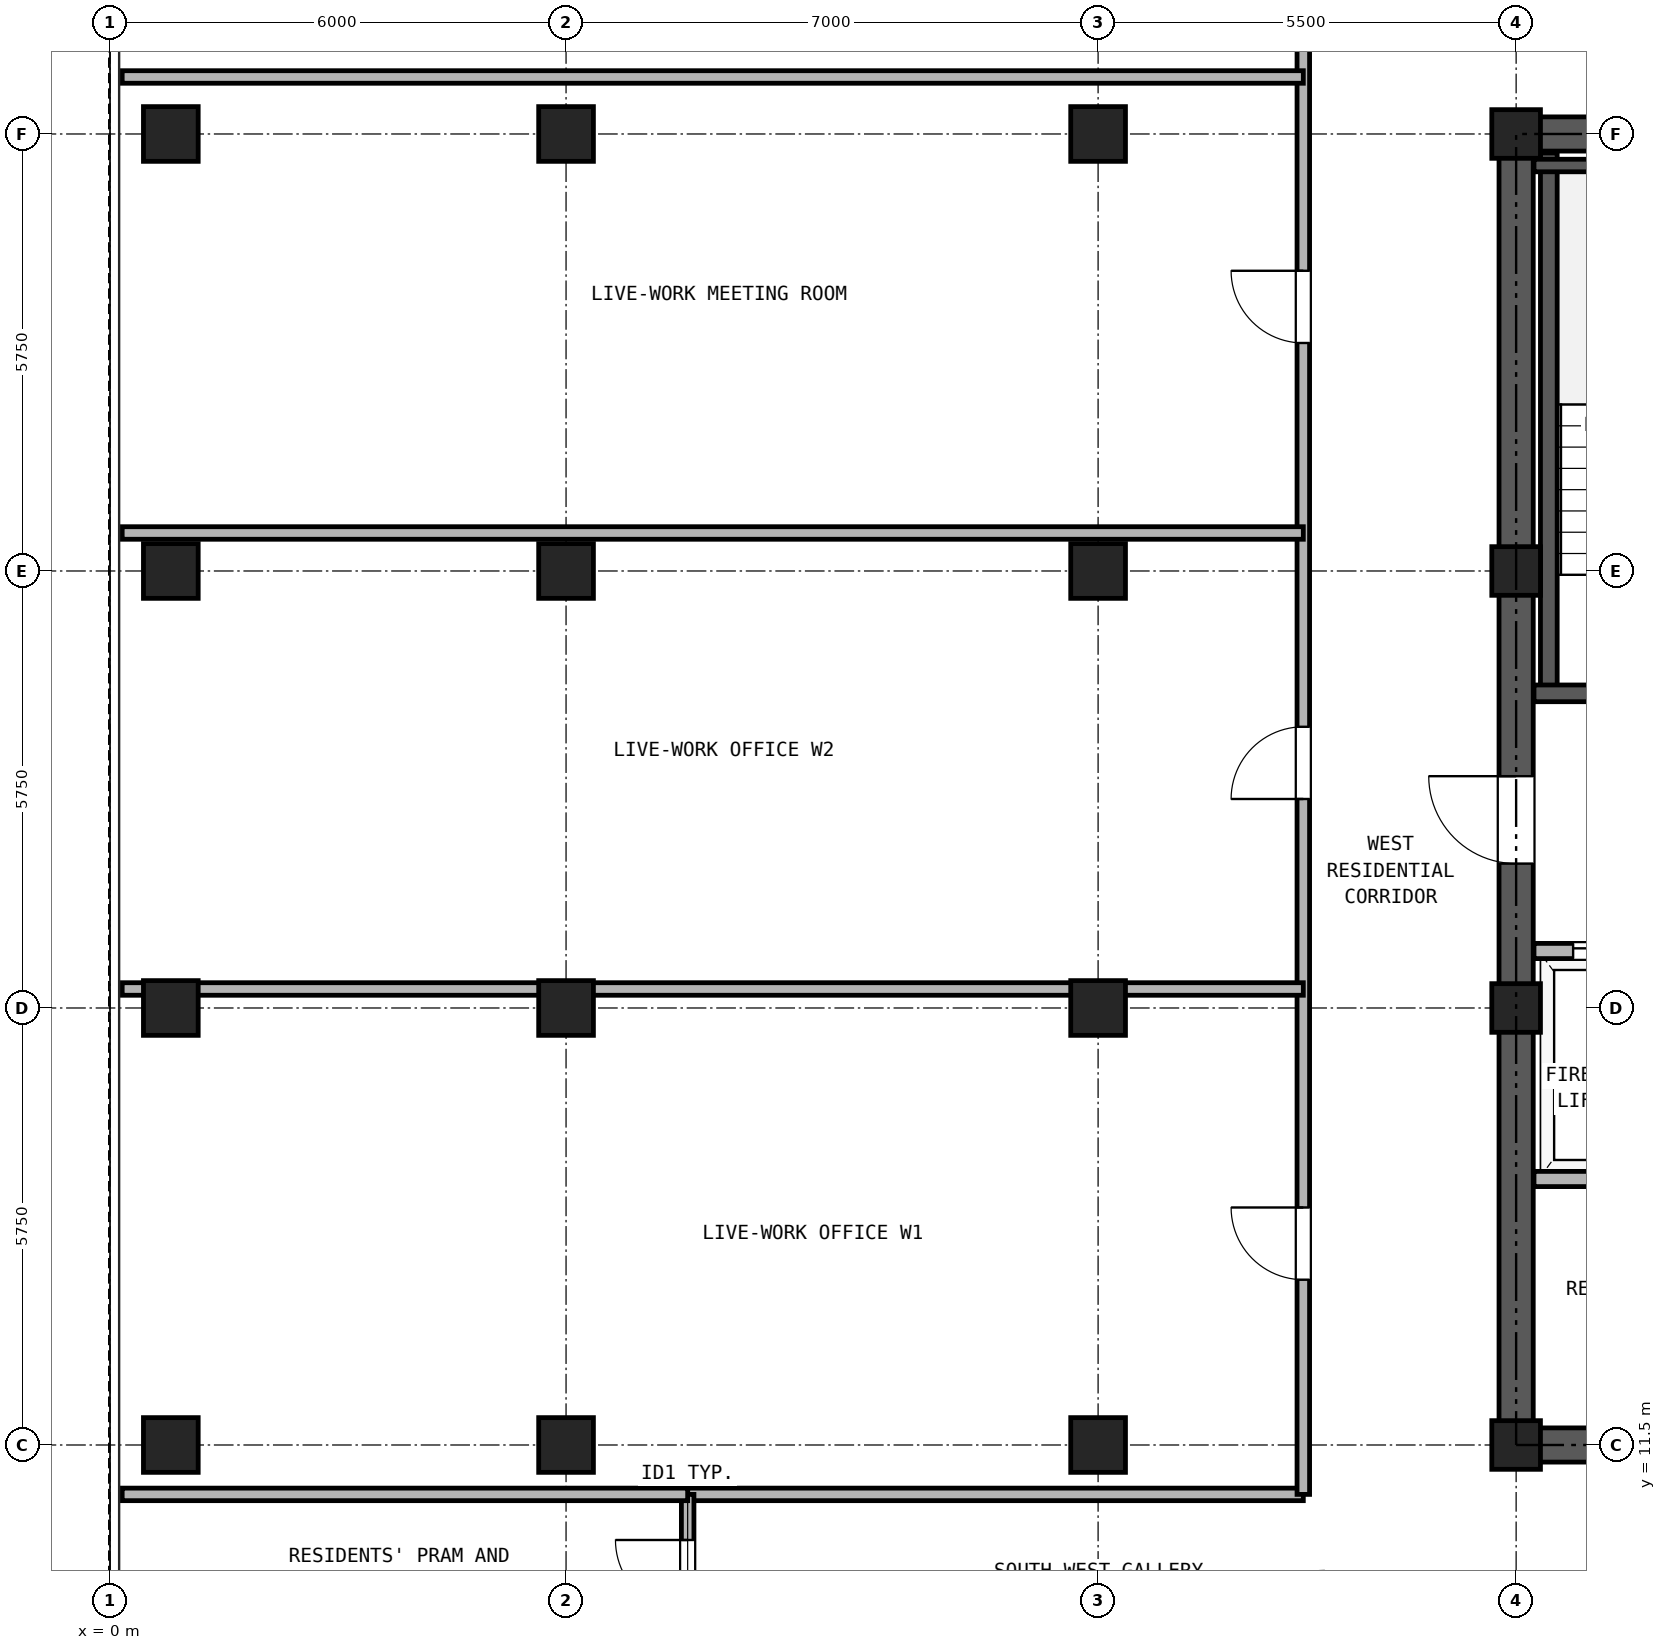
"""IFC4 building model, lengths in metres.
Left out: names, types, materials, properties, quantities, classifications, styles, units other than length and angle.
Written with IfcOpenShell. Run it as: python <this file> out.ifc"""

import sys

from ifc_helpers import new_model, si_unit, direction, frame, frame_2d, origin, origin_2d, place, context, subcontext, project, spatial, rectangle, hollow_rectangle, extrude, source, transform, mapped, element, fill, save


model = new_model("IFC4")
c1 = context("Model", 3, precision=1e-05, world=origin(), true_north=direction((0.0, 1.0)))
c2 = subcontext(c1, "Body", "Model", "MODEL_VIEW")
j1 = project(units=[si_unit("LENGTHUNIT", "METRE"), si_unit("PLANEANGLEUNIT", "RADIAN")], contexts=[c1])
p1 = place(None, origin())
s1 = spatial("IfcSite", under=j1, at=p1, CompositionType="ELEMENT")
p2 = place(p1, origin())
s2 = spatial("IfcBuilding", under=s1, at=p2, CompositionType="ELEMENT")
p3 = place(p2, frame((0.0, 0.0, 202.8)))
s3 = spatial("IfcBuildingStorey", under=s2, at=p3, CompositionType="ELEMENT", Elevation=202.8)
m1 = source(origin(), c2, "Body", "SweptSolid", [
    extrude(hollow_rectangle(XDim=0.72, YDim=0.72, WallThickness=0.04, at=origin_2d()), origin(), (0.0, 0.0, 1.0), 2.95),
])
for number, where, z_axis, x_axis in (
    (1, (0.8, 11.5, 0.0), (0.0, 0.0, 1.0), (1.0, 0.0, 0.0)),
    (2, (0.8, 17.25, 0.0), (0.0, 0.0, 1.0), (1.0, 0.0, 0.0)),
    (3, (0.8, 23.0, 0.0), (0.0, 0.0, 1.0), (1.0, 0.0, 0.0)),
    (4, (0.8, 28.75, 0.0), (0.0, 0.0, 1.0), (1.0, 0.0, 0.0)),
    (5, (6.0, 11.5, 0.0), (0.0, 0.0, 1.0), (1.0, 0.0, 0.0)),
    (6, (6.0, 17.25, 0.0), (0.0, 0.0, 1.0), (1.0, 0.0, 0.0)),
    (7, (6.0, 23.0, 0.0), (0.0, 0.0, 1.0), (1.0, 0.0, 0.0)),
    (8, (6.0, 28.75, 0.0), (0.0, 0.0, 1.0), (1.0, 0.0, 0.0)),
    (9, (13.0, 11.5, 0.0), (0.0, 0.0, 1.0), (1.0, 0.0, 0.0)),
    (10, (13.0, 17.25, 0.0), (0.0, 0.0, 1.0), (1.0, 0.0, 0.0)),
    (11, (13.0, 23.0, 0.0), (0.0, 0.0, 1.0), (1.0, 0.0, 0.0)),
    (12, (13.0, 28.75, 0.0), (0.0, 0.0, 1.0), (1.0, 0.0, 0.0)),
):
    element("IfcColumn", number, at=place(p3, frame(where, z_axis=z_axis, x_axis=x_axis)), inside=s3, PredefinedType="COLUMN", context=c2, shape_type="MappedRepresentation", body=[
        mapped(m1, transform((0.0, 0.0, 0.0), x_axis=(1.0, 0.0, 0.0), y_axis=(0.0, 1.0, 0.0), z_axis=(0.0, 0.0, 1.0), scale=1.0)),
    ])
m2 = source(origin(), c2, "Body", "SweptSolid", [
    extrude(hollow_rectangle(XDim=0.64, YDim=0.64, WallThickness=0.035, at=origin_2d()), origin(), (0.0, 0.0, 1.0), 2.95),
])
for number, where, z_axis, x_axis in (
    (13, (18.5, 11.5, 0.0), (0.0, 0.0, 1.0), (1.0, 0.0, 0.0)),
    (14, (18.5, 17.25, 0.0), (0.0, 0.0, 1.0), (1.0, 0.0, 0.0)),
    (15, (18.5, 23.0, 0.0), (0.0, 0.0, 1.0), (1.0, 0.0, 0.0)),
    (16, (18.5, 28.75, 0.0), (0.0, 0.0, 1.0), (1.0, 0.0, 0.0)),
):
    element("IfcColumn", number, at=place(p3, frame(where, z_axis=z_axis, x_axis=x_axis)), inside=s3, PredefinedType="COLUMN", context=c2, shape_type="MappedRepresentation", body=[
        mapped(m2, transform((0.0, 0.0, 0.0), x_axis=(1.0, 0.0, 0.0), y_axis=(0.0, 1.0, 0.0), z_axis=(0.0, 0.0, 1.0), scale=1.0)),
    ])
p4 = place(p3, frame((18.275, 11.5, 0.0), z_axis=(0.0, 0.0, 1.0), x_axis=(1.0, 0.0, 0.0)))
e17 = element("IfcWall", 17, at=p4, inside=s3, PredefinedType="SHEAR", context=c2, shape_type="SweptSolid", body=[
    extrude(rectangle(XDim=10.45, YDim=0.45, at=frame_2d((5.225, 0.0))), origin(), (0.0, 0.0, 1.0), 2.95),
])
p5 = place(p4, frame((1.825, 0.0, 0.0)))
e18 = element("IfcOpeningElement", 18, at=p5, cuts=e17, PredefinedType="OPENING", context=c2, shape_type="SweptSolid", body=[
    extrude(rectangle(XDim=0.95, YDim=2.15, at=frame_2d((0.475, 1.075))), frame((0.0, 0.235, 0.0), z_axis=(0.0, -1.0, 0.0), x_axis=(1.0, 0.0, 0.0)), (0.0, 0.0, 1.0), 0.47),
])
p6 = place(p4, frame((5.325, 0.0, 0.0)))
e19 = element("IfcOpeningElement", 19, at=p6, cuts=e17, PredefinedType="OPENING", context=c2, shape_type="SweptSolid", body=[
    extrude(rectangle(XDim=0.95, YDim=2.15, at=frame_2d((0.475, 1.075))), frame((0.0, 0.235, 0.0), z_axis=(0.0, -1.0, 0.0), x_axis=(1.0, 0.0, 0.0)), (0.0, 0.0, 1.0), 0.47),
])
p7 = place(p4, frame((8.225, 0.0, 0.0)))
e20 = element("IfcOpeningElement", 20, at=p7, cuts=e17, PredefinedType="OPENING", context=c2, shape_type="SweptSolid", body=[
    extrude(rectangle(XDim=1.1, YDim=2.25, at=frame_2d((0.55, 1.125))), frame((0.0, 0.235, 0.0), z_axis=(0.0, -1.0, 0.0), x_axis=(1.0, 0.0, 0.0)), (0.0, 0.0, 1.0), 0.47),
])
p8 = place(p3, frame((18.275, 28.75, 0.0), z_axis=(0.0, 0.0, 1.0), x_axis=(1.0, 0.0, 0.0)))
e21 = element("IfcWall", 21, at=p8, inside=s3, PredefinedType="SHEAR", context=c2, shape_type="SweptSolid", body=[
    extrude(rectangle(XDim=10.45, YDim=0.45, at=frame_2d((5.225, 0.0))), origin(), (0.0, 0.0, 1.0), 2.95),
])
p9 = place(p8, frame((4.105, 0.0, 0.0)))
e22 = element("IfcOpeningElement", 22, at=p9, cuts=e21, PredefinedType="OPENING", context=c2, shape_type="SweptSolid", body=[
    extrude(rectangle(XDim=0.9, YDim=2.05, at=frame_2d((0.45, 1.025))), frame((0.0, 0.235, 0.0), z_axis=(0.0, -1.0, 0.0), x_axis=(1.0, 0.0, 0.0)), (0.0, 0.0, 1.0), 0.47),
])
p10 = place(p8, frame((5.645, 0.0, 0.0)))
e23 = element("IfcOpeningElement", 23, at=p10, cuts=e21, PredefinedType="OPENING", context=c2, shape_type="SweptSolid", body=[
    extrude(rectangle(XDim=0.9, YDim=2.05, at=frame_2d((0.45, 1.025))), frame((0.0, 0.235, 0.0), z_axis=(0.0, -1.0, 0.0), x_axis=(1.0, 0.0, 0.0)), (0.0, 0.0, 1.0), 0.47),
])
p11 = place(p3, frame((18.5, 11.725, 0.0), z_axis=(0.0, 0.0, 1.0), x_axis=(0.0, 1.0, 0.0)))
e24 = element("IfcWall", 24, at=p11, inside=s3, PredefinedType="SHEAR", context=c2, shape_type="SweptSolid", body=[
    extrude(rectangle(XDim=16.8, YDim=0.45, at=frame_2d((8.4, 0.0))), origin(), (0.0, 0.0, 1.0), 2.95),
])
p12 = place(p11, frame((7.425, 0.0, 0.0)))
e25 = element("IfcOpeningElement", 25, at=p12, cuts=e24, PredefinedType="OPENING", context=c2, shape_type="SweptSolid", body=[
    extrude(rectangle(XDim=1.15, YDim=2.2, at=frame_2d((0.575, 1.1))), frame((0.0, 0.235, 0.0), z_axis=(0.0, -1.0, 0.0), x_axis=(1.0, 0.0, 0.0)), (0.0, 0.0, 1.0), 0.47),
])
p13 = place(p3, frame((18.93, 21.39, 0.0), z_axis=(0.0, 0.0, 1.0), x_axis=(0.0, 1.0, 0.0)))
e26 = element("IfcWall", 26, at=p13, inside=s3, PredefinedType="SOLIDWALL", context=c2, shape_type="SweptSolid", body=[
    extrude(rectangle(XDim=7.11, YDim=0.22, at=frame_2d((3.555, 0.0))), origin(), (0.0, 0.0, 1.0), 2.95),
])
p14 = place(p3, frame((18.735, 28.335, 0.0), z_axis=(0.0, 0.0, 1.0), x_axis=(1.0, 0.0, 0.0)))
e27 = element("IfcWall", 27, at=p14, inside=s3, PredefinedType="PARTITIONING", context=c2, shape_type="SweptSolid", body=[
    extrude(rectangle(XDim=3.375, YDim=0.165, at=frame_2d((1.688, 0.0))), origin(), (0.0, 0.0, 1.0), 2.95),
])
p15 = place(p3, frame((18.735, 21.39, 0.0), z_axis=(0.0, 0.0, 1.0), x_axis=(1.0, 0.0, 0.0)))
e28 = element("IfcWall", 28, at=p15, inside=s3, PredefinedType="SOLIDWALL", context=c2, shape_type="SweptSolid", body=[
    extrude(rectangle(XDim=6.395, YDim=0.22, at=frame_2d((3.197, 0.0))), origin(), (0.0, 0.0, 1.0), 2.95),
])
p16 = place(p15, frame((1.115, 0.0, 0.0)))
e29 = element("IfcOpeningElement", 29, at=p16, cuts=e28, PredefinedType="OPENING", context=c2, shape_type="SweptSolid", body=[
    extrude(rectangle(XDim=1.15, YDim=2.2, at=frame_2d((0.575, 1.1))), frame((0.0, 0.12, 0.0), z_axis=(0.0, -1.0, 0.0), x_axis=(1.0, 0.0, 0.0)), (0.0, 0.0, 1.0), 0.24),
])
p17 = place(p15, frame((4.845, 0.0, 0.0)))
e30 = element("IfcOpeningElement", 30, at=p17, cuts=e28, PredefinedType="OPENING", context=c2, shape_type="SweptSolid", body=[
    extrude(rectangle(XDim=1.1, YDim=2.25, at=frame_2d((0.55, 1.125))), frame((0.0, 0.12, 0.0), z_axis=(0.0, -1.0, 0.0), x_axis=(1.0, 0.0, 0.0)), (0.0, 0.0, 1.0), 0.24),
])
p18 = place(p3, frame((18.735, 18.0, 0.0), z_axis=(0.0, 0.0, 1.0), x_axis=(1.0, 0.0, 0.0)))
e31 = element("IfcWall", 31, at=p18, inside=s3, PredefinedType="PARTITIONING", context=c2, shape_type="SweptSolid", body=[
    extrude(rectangle(XDim=9.53, YDim=0.2, at=frame_2d((4.765, 0.0))), origin(), (0.0, 0.0, 1.0), 2.95),
])
p19 = place(p18, frame((0.515, 0.0, 0.0)))
e32 = element("IfcOpeningElement", 32, at=p19, cuts=e31, PredefinedType="OPENING", context=c2, shape_type="SweptSolid", body=[
    extrude(rectangle(XDim=1.3, YDim=2.3, at=frame_2d((0.65, 1.15))), frame((0.0, 0.11, 0.0), z_axis=(0.0, -1.0, 0.0), x_axis=(1.0, 0.0, 0.0)), (0.0, 0.0, 1.0), 0.22),
])
p20 = place(p18, frame((2.615, 0.0, 0.0)))
e33 = element("IfcOpeningElement", 33, at=p20, cuts=e31, PredefinedType="OPENING", context=c2, shape_type="SweptSolid", body=[
    extrude(rectangle(XDim=1.3, YDim=2.3, at=frame_2d((0.65, 1.15))), frame((0.0, 0.11, 0.0), z_axis=(0.0, -1.0, 0.0), x_axis=(1.0, 0.0, 0.0)), (0.0, 0.0, 1.0), 0.22),
])
p21 = place(p18, frame((7.115, 0.0, 0.0)))
e34 = element("IfcOpeningElement", 34, at=p21, cuts=e31, PredefinedType="OPENING", context=c2, shape_type="SweptSolid", body=[
    extrude(rectangle(XDim=1.0, YDim=2.15, at=frame_2d((0.5, 1.075))), frame((0.0, 0.11, 0.0), z_axis=(0.0, -1.0, 0.0), x_axis=(1.0, 0.0, 0.0)), (0.0, 0.0, 1.0), 0.22),
])
p22 = place(p3, frame((18.735, 15.0, 0.0), z_axis=(0.0, 0.0, 1.0), x_axis=(1.0, 0.0, 0.0)))
e35 = element("IfcWall", 35, at=p22, inside=s3, PredefinedType="PARTITIONING", context=c2, shape_type="SweptSolid", body=[
    extrude(rectangle(XDim=9.53, YDim=0.2, at=frame_2d((4.765, 0.0))), origin(), (0.0, 0.0, 1.0), 2.95),
])
p23 = place(p3, frame((7.6, 10.85, 0.0), z_axis=(0.0, 0.0, 1.0), x_axis=(1.0, 0.0, 0.0)))
e36 = element("IfcWall", 36, at=p23, inside=s3, PredefinedType="PARTITIONING", context=c2, shape_type="SweptSolid", body=[
    extrude(rectangle(XDim=8.1, YDim=0.165, at=frame_2d((4.05, 0.0))), origin(), (0.0, 0.0, 1.0), 2.95),
])
p24 = place(p3, frame((7.6, 8.85, 0.0), z_axis=(0.0, 0.0, 1.0), x_axis=(0.0, 1.0, 0.0)))
e37 = element("IfcWall", 37, at=p24, inside=s3, PredefinedType="PARTITIONING", context=c2, shape_type="SweptSolid", body=[
    extrude(rectangle(XDim=2.0, YDim=0.165, at=frame_2d((1.0, 0.0))), origin(), (0.0, 0.0, 1.0), 2.95),
])
p25 = place(p24, frame((0.45, 0.0, 0.0)))
e38 = element("IfcOpeningElement", 38, at=p25, cuts=e37, PredefinedType="OPENING", context=c2, shape_type="SweptSolid", body=[
    extrude(rectangle(XDim=0.95, YDim=2.15, at=frame_2d((0.475, 1.075))), frame((0.0, 0.093, 0.0), z_axis=(0.0, -1.0, 0.0), x_axis=(1.0, 0.0, 0.0)), (0.0, 0.0, 1.0), 0.185),
])
p26 = place(p3, frame((15.7, 10.85, 0.0), z_axis=(0.0, 0.0, 1.0), x_axis=(0.0, 1.0, 0.0)))
e39 = element("IfcWall", 39, at=p26, inside=s3, PredefinedType="PARTITIONING", context=c2, shape_type="SweptSolid", body=[
    extrude(rectangle(XDim=24.29, YDim=0.165, at=frame_2d((12.145, 0.0))), origin(), (0.0, 0.0, 1.0), 2.95),
])
p27 = place(p26, frame((2.825, 0.0, 0.0)))
e40 = element("IfcOpeningElement", 40, at=p27, cuts=e39, PredefinedType="OPENING", context=c2, shape_type="SweptSolid", body=[
    extrude(rectangle(XDim=0.95, YDim=2.15, at=frame_2d((0.475, 1.075))), frame((0.0, 0.093, 0.0), z_axis=(0.0, -1.0, 0.0), x_axis=(1.0, 0.0, 0.0)), (0.0, 0.0, 1.0), 0.185),
])
p28 = place(p26, frame((9.15, 0.0, 0.0)))
e41 = element("IfcOpeningElement", 41, at=p28, cuts=e39, PredefinedType="OPENING", context=c2, shape_type="SweptSolid", body=[
    extrude(rectangle(XDim=0.95, YDim=2.15, at=frame_2d((0.475, 1.075))), frame((0.0, 0.093, 0.0), z_axis=(0.0, -1.0, 0.0), x_axis=(1.0, 0.0, 0.0)), (0.0, 0.0, 1.0), 0.185),
])
p29 = place(p26, frame((15.15, 0.0, 0.0)))
e42 = element("IfcOpeningElement", 42, at=p29, cuts=e39, PredefinedType="OPENING", context=c2, shape_type="SweptSolid", body=[
    extrude(rectangle(XDim=0.95, YDim=2.15, at=frame_2d((0.475, 1.075))), frame((0.0, 0.093, 0.0), z_axis=(0.0, -1.0, 0.0), x_axis=(1.0, 0.0, 0.0)), (0.0, 0.0, 1.0), 0.185),
])
p30 = place(p26, frame((20.97, 0.0, 0.0)))
e43 = element("IfcOpeningElement", 43, at=p30, cuts=e39, PredefinedType="OPENING", context=c2, shape_type="SweptSolid", body=[
    extrude(rectangle(XDim=0.95, YDim=2.15, at=frame_2d((0.475, 1.075))), frame((0.0, 0.093, 0.0), z_axis=(0.0, -1.0, 0.0), x_axis=(1.0, 0.0, 0.0)), (0.0, 0.0, 1.0), 0.185),
])
p31 = place(p3, frame((0.16, 10.85, 0.0), z_axis=(0.0, 0.0, 1.0), x_axis=(1.0, 0.0, 0.0)))
e44 = element("IfcWall", 44, at=p31, inside=s3, PredefinedType="PARTITIONING", context=c2, shape_type="SweptSolid", body=[
    extrude(rectangle(XDim=7.44, YDim=0.165, at=frame_2d((3.72, 0.0))), origin(), (0.0, 0.0, 1.0), 2.95),
])
p32 = place(p3, frame((0.16, 17.5, 0.0), z_axis=(0.0, 0.0, 1.0), x_axis=(1.0, 0.0, 0.0)))
e45 = element("IfcWall", 45, at=p32, inside=s3, PredefinedType="PARTITIONING", context=c2, shape_type="SweptSolid", body=[
    extrude(rectangle(XDim=15.54, YDim=0.165, at=frame_2d((7.77, 0.0))), origin(), (0.0, 0.0, 1.0), 2.323),
])
for number, where, z_axis, x_axis in (
    (46, (0.16, 23.5, 0.0), (0.0, 0.0, 1.0), (1.0, 0.0, 0.0)),
    (47, (0.16, 29.5, 0.0), (0.0, 0.0, 1.0), (1.0, 0.0, 0.0)),
):
    element("IfcWall", number, at=place(p3, frame(where, z_axis=z_axis, x_axis=x_axis)), inside=s3, PredefinedType="PARTITIONING", context=c2, shape_type="SweptSolid", body=[
        extrude(rectangle(XDim=15.54, YDim=0.165, at=frame_2d((7.77, 0.0))), origin(), (0.0, 0.0, 1.0), 2.95),
    ])
p33 = place(p19, origin())
e48 = element("IfcDoor", 48, at=p33, inside=s3, OperationType="DOUBLE_DOOR_SLIDING", PredefinedType="DOOR", context=c2, shape_type="SweptSolid", body=[
    extrude(rectangle(XDim=1.3, YDim=2.3, at=frame_2d((0.65, 1.15))), frame((0.0, 0.025, 0.0), z_axis=(0.0, -1.0, 0.0), x_axis=(1.0, 0.0, 0.0)), (0.0, 0.0, 1.0), 0.05),
])
fill(e32, e48)
p34 = place(p12, frame((1.15, 0.0, 0.0), z_axis=(0.0, 0.0, 1.0), x_axis=(-1.0, 0.0, 0.0)))
e49 = element("IfcDoor", 49, at=p34, inside=s3, OperationType="SINGLE_SWING_RIGHT", PredefinedType="DOOR", context=c2, shape_type="SweptSolid", body=[
    extrude(rectangle(XDim=1.15, YDim=2.2, at=frame_2d((0.575, 1.1))), frame((0.0, 0.025, 0.0), z_axis=(0.0, -1.0, 0.0), x_axis=(1.0, 0.0, 0.0)), (0.0, 0.0, 1.0), 0.05),
])
fill(e25, e49)
p35 = place(p25, frame((0.95, 0.0, 0.0), z_axis=(0.0, 0.0, 1.0), x_axis=(-1.0, 0.0, 0.0)))
e50 = element("IfcDoor", 50, at=p35, inside=s3, OperationType="SINGLE_SWING_RIGHT", PredefinedType="DOOR", context=c2, shape_type="SweptSolid", body=[
    extrude(rectangle(XDim=0.95, YDim=2.15, at=frame_2d((0.475, 1.075))), frame((0.0, 0.025, 0.0), z_axis=(0.0, -1.0, 0.0), x_axis=(1.0, 0.0, 0.0)), (0.0, 0.0, 1.0), 0.05),
])
fill(e38, e50)
p36 = place(p27, frame((0.95, 0.0, 0.0), z_axis=(0.0, 0.0, 1.0), x_axis=(-1.0, 0.0, 0.0)))
e51 = element("IfcDoor", 51, at=p36, inside=s3, OperationType="SINGLE_SWING_RIGHT", PredefinedType="DOOR", context=c2, shape_type="SweptSolid", body=[
    extrude(rectangle(XDim=0.95, YDim=2.15, at=frame_2d((0.475, 1.075))), frame((0.0, 0.025, 0.0), z_axis=(0.0, -1.0, 0.0), x_axis=(1.0, 0.0, 0.0)), (0.0, 0.0, 1.0), 0.05),
])
fill(e40, e51)
p37 = place(p28, frame((0.95, 0.0, 0.0), z_axis=(0.0, 0.0, 1.0), x_axis=(-1.0, 0.0, 0.0)))
e52 = element("IfcDoor", 52, at=p37, inside=s3, OperationType="SINGLE_SWING_LEFT", PredefinedType="DOOR", context=c2, shape_type="SweptSolid", body=[
    extrude(rectangle(XDim=0.95, YDim=2.15, at=frame_2d((0.475, 1.075))), frame((0.0, 0.025, 0.0), z_axis=(0.0, -1.0, 0.0), x_axis=(1.0, 0.0, 0.0)), (0.0, 0.0, 1.0), 0.05),
])
fill(e41, e52)
p38 = place(p29, frame((0.95, 0.0, 0.0), z_axis=(0.0, 0.0, 1.0), x_axis=(-1.0, 0.0, 0.0)))
e53 = element("IfcDoor", 53, at=p38, inside=s3, OperationType="SINGLE_SWING_RIGHT", PredefinedType="DOOR", context=c2, shape_type="SweptSolid", body=[
    extrude(rectangle(XDim=0.95, YDim=2.15, at=frame_2d((0.475, 1.075))), frame((0.0, 0.025, 0.0), z_axis=(0.0, -1.0, 0.0), x_axis=(1.0, 0.0, 0.0)), (0.0, 0.0, 1.0), 0.05),
])
fill(e42, e53)
save(model, sys.argv[1])
